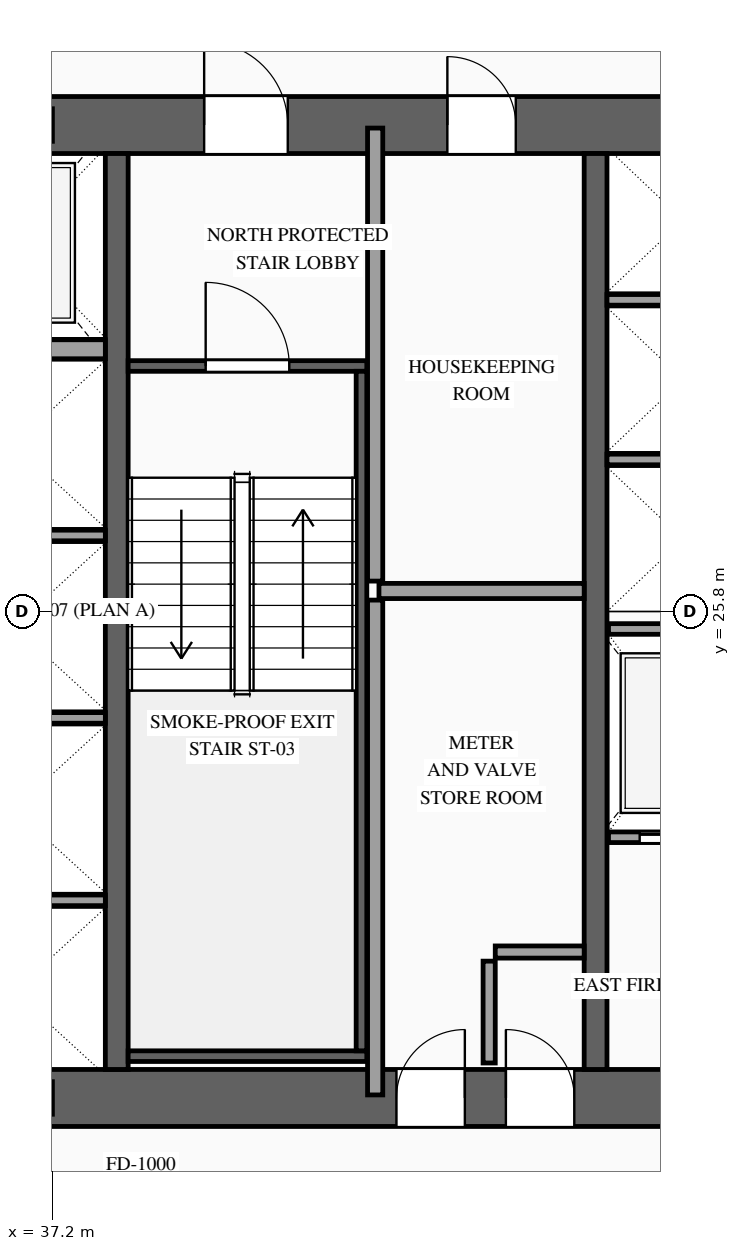
"""IFC4 building model, lengths in metres.
Left out: names, types, materials, properties, quantities, classifications, styles, units other than length and angle.
Written with IfcOpenShell. Run it as: python <this file> out.ifc"""

import sys

from ifc_helpers import new_model, si_unit, direction, frame, frame_2d, origin, origin_2d, place, context, subcontext, project, spatial, rectangle, i_section, extrude, source, transform, mapped, element, fill, save


model = new_model("IFC4")
c1 = context("Model", 3, precision=1e-05, world=origin(), true_north=direction((0.0, 1.0)))
c2 = subcontext(c1, "Body", "Model", "MODEL_VIEW")
j1 = project(units=[si_unit("LENGTHUNIT", "METRE"), si_unit("PLANEANGLEUNIT", "RADIAN")], contexts=[c1])
p1 = place(None, origin())
s1 = spatial("IfcSite", under=j1, at=p1, CompositionType="ELEMENT")
p2 = place(p1, origin())
s2 = spatial("IfcBuilding", under=s1, at=p2, CompositionType="ELEMENT")
p3 = place(p2, frame((0.0, 0.0, 90.2)))
s3 = spatial("IfcBuildingStorey", under=s2, at=p3, CompositionType="ELEMENT", Elevation=90.2)
p4 = place(p3, frame((23.425, 19.4, 0.0), z_axis=(0.0, 0.0, 1.0), x_axis=(1.0, 0.0, 0.0)))
e1 = element("IfcWall", 1, at=p4, inside=s3, PredefinedType="SHEAR", context=c2, shape_type="SweptSolid", body=[
    extrude(rectangle(XDim=27.15, YDim=0.75, at=frame_2d((13.575, 0.0))), origin(), (0.0, 0.0, 1.0), 3.6),
])
p5 = place(p4, frame((2.025, 0.0, 0.0)))
e2 = element("IfcOpeningElement", 2, at=p5, cuts=e1, PredefinedType="OPENING", context=c2, shape_type="SweptSolid", body=[
    extrude(rectangle(XDim=1.1, YDim=2.2, at=frame_2d((0.55, 1.1))), frame((0.0, 0.39, 0.0), z_axis=(0.0, -1.0, 0.0), x_axis=(1.0, 0.0, 0.0)), (0.0, 0.0, 1.0), 0.78),
])
p6 = place(p4, frame((9.925, 0.0, 0.0)))
e3 = element("IfcOpeningElement", 3, at=p6, cuts=e1, PredefinedType="OPENING", context=c2, shape_type="SweptSolid", body=[
    extrude(rectangle(XDim=1.1, YDim=2.2, at=frame_2d((0.55, 1.1))), frame((0.0, 0.39, 0.0), z_axis=(0.0, -1.0, 0.0), x_axis=(1.0, 0.0, 0.0)), (0.0, 0.0, 1.0), 0.78),
])
p7 = place(p4, frame((23.125, 0.0, 0.0)))
e4 = element("IfcOpeningElement", 4, at=p7, cuts=e1, PredefinedType="OPENING", context=c2, shape_type="SweptSolid", body=[
    extrude(rectangle(XDim=1.1, YDim=2.2, at=frame_2d((0.55, 1.1))), frame((0.0, 0.39, 0.0), z_axis=(0.0, -1.0, 0.0), x_axis=(1.0, 0.0, 0.0)), (0.0, 0.0, 1.0), 0.78),
])
p8 = place(p4, frame((19.745, 0.0, 0.0)))
e5 = element("IfcOpeningElement", 5, at=p8, cuts=e1, PredefinedType="OPENING", context=c2, shape_type="SweptSolid", body=[
    extrude(rectangle(XDim=0.9, YDim=2.15, at=frame_2d((0.45, 1.075))), frame((0.0, 0.39, 0.0), z_axis=(0.0, -1.0, 0.0), x_axis=(1.0, 0.0, 0.0)), (0.0, 0.0, 1.0), 0.78),
])
p9 = place(p4, frame((18.305, 0.0, 0.0)))
e6 = element("IfcOpeningElement", 6, at=p9, cuts=e1, PredefinedType="OPENING", context=c2, shape_type="SweptSolid", body=[
    extrude(rectangle(XDim=0.9, YDim=2.15, at=frame_2d((0.45, 1.075))), frame((0.0, 0.39, 0.0), z_axis=(0.0, -1.0, 0.0), x_axis=(1.0, 0.0, 0.0)), (0.0, 0.0, 1.0), 0.78),
])
p10 = place(p3, frame((23.425, 32.2, 0.0), z_axis=(0.0, 0.0, 1.0), x_axis=(1.0, 0.0, 0.0)))
e7 = element("IfcWall", 7, at=p10, inside=s3, PredefinedType="SHEAR", context=c2, shape_type="SweptSolid", body=[
    extrude(rectangle(XDim=27.15, YDim=0.75, at=frame_2d((13.575, 0.0))), origin(), (0.0, 0.0, 1.0), 3.6),
])
p11 = place(p10, frame((4.645, 0.0, 0.0)))
e8 = element("IfcOpeningElement", 8, at=p11, cuts=e7, PredefinedType="OPENING", context=c2, shape_type="SweptSolid", body=[
    extrude(rectangle(XDim=0.9, YDim=2.15, at=frame_2d((0.45, 1.075))), frame((0.0, 0.39, 0.0), z_axis=(0.0, -1.0, 0.0), x_axis=(1.0, 0.0, 0.0)), (0.0, 0.0, 1.0), 0.78),
])
p12 = place(p10, frame((9.925, 0.0, 0.0)))
e9 = element("IfcOpeningElement", 9, at=p12, cuts=e7, PredefinedType="OPENING", context=c2, shape_type="SweptSolid", body=[
    extrude(rectangle(XDim=1.1, YDim=2.2, at=frame_2d((0.55, 1.1))), frame((0.0, 0.39, 0.0), z_axis=(0.0, -1.0, 0.0), x_axis=(1.0, 0.0, 0.0)), (0.0, 0.0, 1.0), 0.78),
])
p13 = place(p10, frame((15.775, 0.0, 0.0)))
e10 = element("IfcOpeningElement", 10, at=p13, cuts=e7, PredefinedType="OPENING", context=c2, shape_type="SweptSolid", body=[
    extrude(rectangle(XDim=1.1, YDim=2.2, at=frame_2d((0.55, 1.1))), frame((0.0, 0.39, 0.0), z_axis=(0.0, -1.0, 0.0), x_axis=(1.0, 0.0, 0.0)), (0.0, 0.0, 1.0), 0.78),
])
p14 = place(p10, frame((18.975, 0.0, 0.0)))
e11 = element("IfcOpeningElement", 11, at=p14, cuts=e7, PredefinedType="OPENING", context=c2, shape_type="SweptSolid", body=[
    extrude(rectangle(XDim=0.9, YDim=2.15, at=frame_2d((0.45, 1.075))), frame((0.0, 0.39, 0.0), z_axis=(0.0, -1.0, 0.0), x_axis=(1.0, 0.0, 0.0)), (0.0, 0.0, 1.0), 0.78),
])
m1 = source(origin(), c2, "Body", "SweptSolid", [
    extrude(rectangle(XDim=12.05, YDim=0.3, at=frame_2d((6.025, 0.0))), origin(), (0.0, 0.0, 1.0), 3.6),
])
for number, where, z_axis, x_axis in (
    (12, (38.05, 19.775, 0.0), (0.0, 0.0, 1.0), (0.0, 1.0, 0.0)),
    (13, (44.35, 19.775, 0.0), (0.0, 0.0, 1.0), (0.0, 1.0, 0.0)),
):
    element("IfcWall", number, at=place(p3, frame(where, z_axis=z_axis, x_axis=x_axis)), inside=s3, PredefinedType="SOLIDWALL", context=c2, shape_type="MappedRepresentation", body=[
        mapped(m1, transform((0.0, 0.0, 0.0), scale=1.0)),
    ])
m2 = source(origin(), c2, "Body", "SweptSolid", [
    extrude(i_section(OverallWidth=0.407, OverallDepth=0.428, WebThickness=0.02, FlangeThickness=0.035, at=origin_2d()), origin(), (0.0, 0.0, 1.0), 3.6),
])
for number, where, z_axis, x_axis in (
    (14, (37.0, 19.4, 0.0), (0.0, 0.0, 1.0), (1.0, 0.0, 0.0)),
    (15, (37.0, 32.2, 0.0), (0.0, 0.0, 1.0), (1.0, 0.0, 0.0)),
):
    element("IfcColumn", number, at=place(p3, frame(where, z_axis=z_axis, x_axis=x_axis)), inside=s3, PredefinedType="COLUMN", context=c2, shape_type="MappedRepresentation", body=[
        mapped(m2, transform((0.0, 0.0, 0.0), scale=1.0)),
    ])
p15 = place(p3, frame((44.52, 22.83, 0.0), z_axis=(0.0, 0.0, 1.0), x_axis=(1.0, 0.0, 0.0)))
e16 = element("IfcWall", 16, at=p15, inside=s3, PredefinedType="SOLIDWALL", context=c2, shape_type="SweptSolid", body=[
    extrude(rectangle(XDim=1.92, YDim=0.14, at=frame_2d((0.96, 0.0))), origin(), (0.0, 0.0, 1.0), 3.38),
])
p16 = place(p15, frame((0.41, 0.0, 0.0)))
e17 = element("IfcOpeningElement", 17, at=p16, cuts=e16, PredefinedType="OPENING", context=c2, shape_type="SweptSolid", body=[
    extrude(rectangle(XDim=1.1, YDim=2.2, at=frame_2d((0.55, 1.1))), frame((0.0, 0.085, 0.0), z_axis=(0.0, -1.0, 0.0), x_axis=(1.0, 0.0, 0.0)), (0.0, 0.0, 1.0), 0.17),
])
m3 = source(origin(), c2, "Body", "SweptSolid", [
    extrude(rectangle(XDim=1.92, YDim=0.14, at=frame_2d((0.96, 0.0))), origin(), (0.0, 0.0, 1.0), 3.38),
])
p17 = place(p3, frame((44.52, 25.57, 0.0), z_axis=(0.0, 0.0, 1.0), x_axis=(1.0, 0.0, 0.0)))
e18 = element("IfcWall", 18, at=p17, inside=s3, PredefinedType="SOLIDWALL", context=c2, shape_type="MappedRepresentation", body=[
    mapped(m3, transform((0.0, 0.0, 0.0), scale=1.0)),
])
m4 = source(origin(), c2, "Body", "SweptSolid", [
    extrude(rectangle(XDim=2.4, YDim=0.14, at=frame_2d((1.2, 0.0))), origin(), (0.0, 0.0, 1.0), 3.38),
])
for number, where, z_axis, x_axis in (
    (19, (35.5, 22.0, 0.0), (0.0, 0.0, 1.0), (1.0, 0.0, 0.0)),
    (20, (35.5, 24.4, 0.0), (0.0, 0.0, 1.0), (1.0, 0.0, 0.0)),
    (21, (35.5, 26.8, 0.0), (0.0, 0.0, 1.0), (1.0, 0.0, 0.0)),
):
    element("IfcWall", number, at=place(p3, frame(where, z_axis=z_axis, x_axis=x_axis)), inside=s3, PredefinedType="SOLIDWALL", context=c2, shape_type="MappedRepresentation", body=[
        mapped(m4, transform((0.0, 0.0, 0.0), scale=1.0)),
    ])
m5 = source(origin(), c2, "Body", "SweptSolid", [
    extrude(rectangle(XDim=2.4, YDim=0.25, at=frame_2d((1.2, 0.0))), origin(), (0.0, 0.0, 1.0), 3.38),
])
p18 = place(p3, frame((35.5, 29.25, 0.0), z_axis=(0.0, 0.0, 1.0), x_axis=(1.0, 0.0, 0.0)))
e22 = element("IfcWall", 22, at=p18, inside=s3, PredefinedType="SOLIDWALL", context=c2, shape_type="MappedRepresentation", body=[
    mapped(m5, transform((0.0, 0.0, 0.0), scale=1.0)),
])
m6 = source(origin(), c2, "Body", "SweptSolid", [
    extrude(rectangle(XDim=2.0, YDim=0.14, at=frame_2d((1.0, 0.0))), origin(), (0.0, 0.0, 1.0), 3.38),
])
for number, where, z_axis, x_axis in (
    (23, (44.5, 27.8, 0.0), (0.0, 0.0, 1.0), (1.0, 0.0, 0.0)),
    (24, (44.5, 29.9, 0.0), (0.0, 0.0, 1.0), (1.0, 0.0, 0.0)),
):
    element("IfcWall", number, at=place(p3, frame(where, z_axis=z_axis, x_axis=x_axis)), inside=s3, PredefinedType="SOLIDWALL", context=c2, shape_type="MappedRepresentation", body=[
        mapped(m6, transform((0.0, 0.0, 0.0), scale=1.0)),
    ])
p19 = place(p3, frame((38.2, 29.03, 0.0), z_axis=(0.0, 0.0, 1.0), x_axis=(1.0, 0.0, 0.0)))
e25 = element("IfcWall", 25, at=p19, inside=s3, PredefinedType="SOLIDWALL", context=c2, shape_type="SweptSolid", body=[
    extrude(rectangle(XDim=3.14, YDim=0.14, at=frame_2d((1.57, 0.0))), origin(), (0.0, 0.0, 1.0), 3.38),
])
p20 = place(p19, frame((1.02, 0.0, 0.0)))
e26 = element("IfcOpeningElement", 26, at=p20, cuts=e25, PredefinedType="OPENING", context=c2, shape_type="SweptSolid", body=[
    extrude(rectangle(XDim=1.1, YDim=2.2, at=frame_2d((0.55, 1.1))), frame((0.0, 0.085, 0.0), z_axis=(0.0, -1.0, 0.0), x_axis=(1.0, 0.0, 0.0)), (0.0, 0.0, 1.0), 0.17),
])
m7 = source(origin(), c2, "Body", "SweptSolid", [
    extrude(rectangle(XDim=3.14, YDim=0.14, at=frame_2d((1.57, 0.0))), origin(), (0.0, 0.0, 1.0), 3.38),
])
p21 = place(p3, frame((38.2, 19.95, 0.0), z_axis=(0.0, 0.0, 1.0), x_axis=(1.0, 0.0, 0.0)))
e27 = element("IfcWall", 27, at=p21, inside=s3, PredefinedType="SOLIDWALL", context=c2, shape_type="MappedRepresentation", body=[
    mapped(m7, transform((0.0, 0.0, 0.0), scale=1.0)),
])
m8 = source(origin(), c2, "Body", "SweptSolid", [
    extrude(rectangle(XDim=8.94, YDim=0.14, at=frame_2d((4.47, 0.0))), origin(), (0.0, 0.0, 1.0), 3.38),
])
p22 = place(p3, frame((41.27, 20.02, 0.0), z_axis=(0.0, 0.0, 1.0), x_axis=(0.0, 1.0, 0.0)))
e28 = element("IfcWall", 28, at=p22, inside=s3, PredefinedType="SOLIDWALL", context=c2, shape_type="MappedRepresentation", body=[
    mapped(m8, transform((0.0, 0.0, 0.0), scale=1.0)),
])
m9 = source(origin(), c2, "Body", "SweptSolid", [
    extrude(rectangle(XDim=1.34, YDim=0.16, at=frame_2d((0.67, 0.0))), origin(), (0.0, 0.0, 1.0), 3.38),
])
p23 = place(p3, frame((42.95, 19.86, 0.0), z_axis=(0.0, 0.0, 1.0), x_axis=(0.0, 1.0, 0.0)))
e29 = element("IfcWall", 29, at=p23, inside=s3, PredefinedType="PARTITIONING", context=c2, shape_type="MappedRepresentation", body=[
    mapped(m9, transform((0.0, 0.0, 0.0), scale=1.0)),
])
m10 = source(origin(), c2, "Body", "SweptSolid", [
    extrude(rectangle(XDim=1.17, YDim=0.16, at=frame_2d((0.585, 0.0))), origin(), (0.0, 0.0, 1.0), 3.38),
])
p24 = place(p3, frame((43.03, 21.32, 0.0), z_axis=(0.0, 0.0, 1.0), x_axis=(1.0, 0.0, 0.0)))
e30 = element("IfcWall", 30, at=p24, inside=s3, PredefinedType="PARTITIONING", context=c2, shape_type="MappedRepresentation", body=[
    mapped(m10, transform((0.0, 0.0, 0.0), scale=1.0)),
])
m11 = source(origin(), c2, "Body", "SweptSolid", [
    extrude(rectangle(XDim=6.51, YDim=0.2, at=frame_2d((3.255, 0.0))), origin(), (0.0, 0.0, 1.0), 3.38),
])
p25 = place(p3, frame((41.45, 19.44, 0.0), z_axis=(0.0, 0.0, 1.0), x_axis=(0.0, 1.0, 0.0)))
e31 = element("IfcWall", 31, at=p25, inside=s3, PredefinedType="PARTITIONING", context=c2, shape_type="MappedRepresentation", body=[
    mapped(m11, transform((0.0, 0.0, 0.0), scale=1.0)),
])
m12 = source(origin(), c2, "Body", "SweptSolid", [
    extrude(rectangle(XDim=2.7, YDim=0.2, at=frame_2d((1.35, 0.0))), origin(), (0.0, 0.0, 1.0), 3.38),
])
p26 = place(p3, frame((41.5, 26.07, 0.0), z_axis=(0.0, 0.0, 1.0), x_axis=(1.0, 0.0, 0.0)))
e32 = element("IfcWall", 32, at=p26, inside=s3, PredefinedType="PARTITIONING", context=c2, shape_type="MappedRepresentation", body=[
    mapped(m12, transform((0.0, 0.0, 0.0), scale=1.0)),
])
m13 = source(origin(), c2, "Body", "SweptSolid", [
    extrude(rectangle(XDim=5.96, YDim=0.2, at=frame_2d((2.98, 0.0))), origin(), (0.0, 0.0, 1.0), 3.38),
])
p27 = place(p3, frame((41.45, 26.2, 0.0), z_axis=(0.0, 0.0, 1.0), x_axis=(0.0, 1.0, 0.0)))
e33 = element("IfcWall", 33, at=p27, inside=s3, PredefinedType="PARTITIONING", context=c2, shape_type="MappedRepresentation", body=[
    mapped(m13, transform((0.0, 0.0, 0.0), scale=1.0)),
])
m14 = source(origin(), c2, "Body", "SweptSolid", [
    extrude(rectangle(XDim=1.1, YDim=2.2, at=frame_2d((0.55, 1.1))), frame((0.0, 0.025, 0.0), z_axis=(0.0, -1.0, 0.0), x_axis=(1.0, 0.0, 0.0)), (0.0, 0.0, 1.0), 0.05),
])
p28 = place(p16, origin())
e34 = element("IfcDoor", 34, at=p28, inside=s3, OperationType="SLIDING_TO_RIGHT", PredefinedType="DOOR", context=c2, shape_type="MappedRepresentation", body=[
    mapped(m14, transform((0.0, 0.0, 0.0), scale=1.0)),
])
fill(e17, e34)
m15 = source(origin(), c2, "Body", "SweptSolid", [
    extrude(rectangle(XDim=1.1, YDim=2.2, at=frame_2d((0.55, 1.1))), frame((0.0, 0.025, 0.0), z_axis=(0.0, -1.0, 0.0), x_axis=(1.0, 0.0, 0.0)), (0.0, 0.0, 1.0), 0.05),
])
p29 = place(p20, origin())
e35 = element("IfcDoor", 35, at=p29, inside=s3, OperationType="SINGLE_SWING_LEFT", PredefinedType="DOOR", context=c2, shape_type="MappedRepresentation", body=[
    mapped(m15, transform((0.0, 0.0, 0.0), scale=1.0)),
])
fill(e26, e35)
p30 = place(p13, origin())
e36 = element("IfcDoor", 36, at=p30, inside=s3, OperationType="SINGLE_SWING_LEFT", PredefinedType="DOOR", context=c2, shape_type="MappedRepresentation", body=[
    mapped(m15, transform((0.0, 0.0, 0.0), scale=1.0)),
])
fill(e10, e36)
m16 = source(origin(), c2, "Body", "SweptSolid", [
    extrude(rectangle(XDim=0.9, YDim=2.15, at=frame_2d((0.45, 1.075))), frame((0.0, 0.025, 0.0), z_axis=(0.0, -1.0, 0.0), x_axis=(1.0, 0.0, 0.0)), (0.0, 0.0, 1.0), 0.05),
])
p31 = place(p8, origin())
e37 = element("IfcDoor", 37, at=p31, inside=s3, OperationType="SINGLE_SWING_LEFT", PredefinedType="DOOR", context=c2, shape_type="MappedRepresentation", body=[
    mapped(m16, transform((0.0, 0.0, 0.0), scale=1.0)),
])
fill(e5, e37)
p32 = place(p9, origin())
e38 = element("IfcDoor", 38, at=p32, inside=s3, OperationType="SINGLE_SWING_RIGHT", PredefinedType="DOOR", context=c2, shape_type="MappedRepresentation", body=[
    mapped(m16, transform((0.0, 0.0, 0.0), scale=1.0)),
])
fill(e6, e38)
p33 = place(p14, origin())
e39 = element("IfcDoor", 39, at=p33, inside=s3, OperationType="SINGLE_SWING_LEFT", PredefinedType="DOOR", context=c2, shape_type="MappedRepresentation", body=[
    mapped(m16, transform((0.0, 0.0, 0.0), scale=1.0)),
])
fill(e11, e39)
save(model, sys.argv[1])
